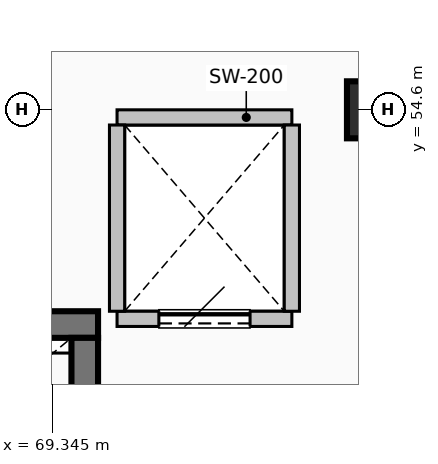
"""IFC4 building model, lengths in metres.
Left out: names, types, materials, properties, quantities, classifications, styles, units other than length and angle.
Written with IfcOpenShell. Run it as: python <this file> out.ifc"""

import sys

from ifc_helpers import new_model, si_unit, direction, frame, frame_2d, origin, origin_2d, place, context, subcontext, project, spatial, rectangle, extrude, element, fill, save


model = new_model("IFC4")
c1 = context("Model", 3, precision=1e-05, world=origin(), true_north=direction((0.0, 1.0)))
c2 = subcontext(c1, "Body", "Model", "MODEL_VIEW")
j1 = project(units=[si_unit("LENGTHUNIT", "METRE"), si_unit("PLANEANGLEUNIT", "RADIAN")], contexts=[c1])
p1 = place(None, origin())
s1 = spatial("IfcSite", under=j1, at=p1, CompositionType="ELEMENT")
p2 = place(p1, origin())
s2 = spatial("IfcBuilding", under=s1, at=p2, CompositionType="ELEMENT")
p3 = place(p2, frame((0.0, 0.0, 10.2)))
s3 = spatial("IfcBuildingStorey", under=s2, at=p3, CompositionType="ELEMENT", Elevation=10.2)
p4 = place(p3, frame((73.6, 54.6, 0.0), z_axis=(0.0, 0.0, 1.0), x_axis=(1.0, 0.0, 0.0)))
e1 = element("IfcColumn", 1, at=p4, inside=s3, PredefinedType="COLUMN", context=c2, shape_type="SweptSolid", body=[
    extrude(rectangle(XDim=0.75, YDim=0.75, at=origin_2d()), origin(), (0.0, 0.0, 1.0), 4.8),
])
p5 = place(p3, frame((69.95, 51.775, 0.0), z_axis=(0.0, 0.0, 1.0), x_axis=(-1.0, 0.0, 0.0)))
e2 = element("IfcWall", 2, at=p5, inside=s3, PredefinedType="SHEAR", context=c2, shape_type="SweptSolid", body=[
    extrude(rectangle(XDim=8.5, YDim=0.35, at=frame_2d((4.25, 0.0))), origin(), (0.0, 0.0, 1.0), 4.48),
])
p6 = place(p3, frame((69.775, 51.6, 0.0), z_axis=(0.0, 0.0, 1.0), x_axis=(0.0, -1.0, 0.0)))
e3 = element("IfcWall", 3, at=p6, inside=s3, PredefinedType="SHEAR", context=c2, shape_type="SweptSolid", body=[
    extrude(rectangle(XDim=3.8, YDim=0.35, at=frame_2d((1.9, 0.0))), origin(), (0.0, 0.0, 1.0), 4.48),
])
p7 = place(p3, frame((70.2, 51.85, 0.0), z_axis=(0.0, 0.0, 1.0), x_axis=(1.0, 0.0, 0.0)))
e4 = element("IfcWall", 4, at=p7, inside=s3, PredefinedType="PARTITIONING", context=c2, shape_type="SweptSolid", body=[
    extrude(rectangle(XDim=2.3, YDim=0.2, at=frame_2d((1.15, 0.0))), origin(), (0.0, 0.0, 1.0), 4.472),
])
p8 = place(p7, frame((0.55, 0.0, 0.0)))
e5 = element("IfcOpeningElement", 5, at=p8, cuts=e4, PredefinedType="OPENING", context=c2, shape_type="SweptSolid", body=[
    extrude(rectangle(XDim=1.2, YDim=2.15, at=frame_2d((0.6, 1.075))), frame((0.0, 0.11, 0.0), z_axis=(0.0, -1.0, 0.0), x_axis=(1.0, 0.0, 0.0)), (0.0, 0.0, 1.0), 0.22),
])
p9 = place(p3, frame((72.5, 54.5, 0.0), z_axis=(0.0, 0.0, 1.0), x_axis=(-1.0, 0.0, 0.0)))
e6 = element("IfcWall", 6, at=p9, inside=s3, PredefinedType="PARTITIONING", context=c2, shape_type="SweptSolid", body=[
    extrude(rectangle(XDim=2.3, YDim=0.2, at=frame_2d((1.15, 0.0))), origin(), (0.0, 0.0, 1.0), 3.722),
])
for number, where, z_axis, x_axis in (
    (7, (70.2, 51.95, 0.0), (0.0, 0.0, 1.0), (0.0, 1.0, 0.0)),
    (8, (72.5, 54.4, 0.0), (0.0, 0.0, 1.0), (0.0, -1.0, 0.0)),
):
    element("IfcWall", number, at=place(p3, frame(where, z_axis=z_axis, x_axis=x_axis)), inside=s3, PredefinedType="PARTITIONING", context=c2, shape_type="SweptSolid", body=[
        extrude(rectangle(XDim=2.45, YDim=0.2, at=frame_2d((1.225, 0.0))), origin(), (0.0, 0.0, 1.0), 4.472),
    ])
p10 = place(p8, origin())
e9 = element("IfcDoor", 9, at=p10, inside=s3, OperationType="SLIDING_TO_LEFT", PredefinedType="DOOR", context=c2, shape_type="SweptSolid", body=[
    extrude(rectangle(XDim=1.2, YDim=2.15, at=frame_2d((0.6, 1.075))), frame((0.0, 0.025, 0.0), z_axis=(0.0, -1.0, 0.0), x_axis=(1.0, 0.0, 0.0)), (0.0, 0.0, 1.0), 0.05),
])
fill(e5, e9)
save(model, sys.argv[1])
